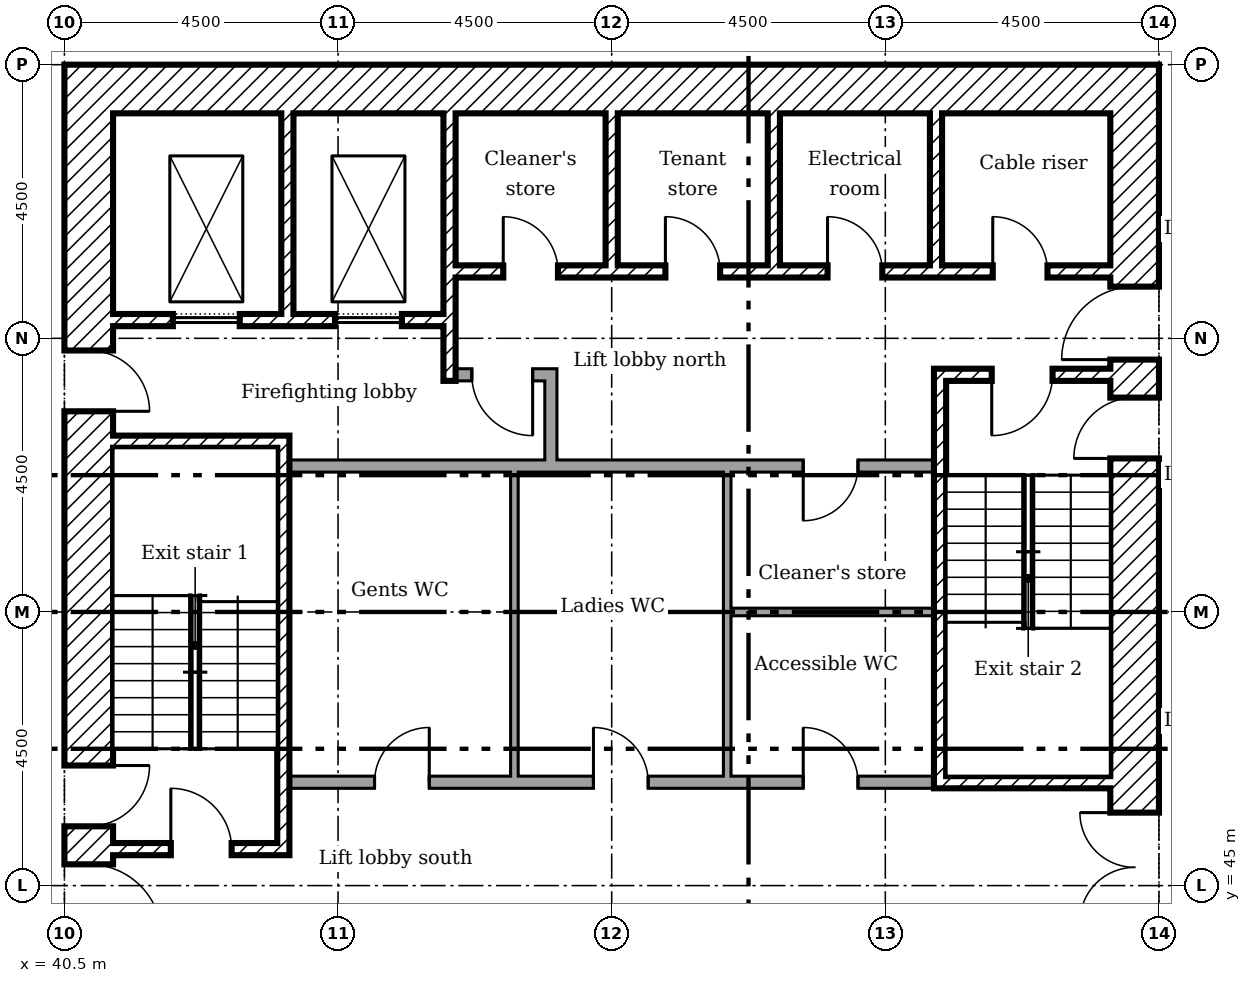
"""IFC4 building model, lengths in metres.
Left out: names, types, materials, properties, quantities, classifications, styles, units other than length and angle.
Written with IfcOpenShell. Run it as: python <this file> out.ifc"""

import sys

from ifc_helpers import new_model, si_unit, direction, frame, frame_2d, origin, place, context, subcontext, project, spatial, rectangle, extrude, element, fill, save


model = new_model("IFC4")
c1 = context("Model", 3, precision=1e-05, world=origin(), true_north=direction((0.0, 1.0)))
c2 = subcontext(c1, "Body", "Model", "MODEL_VIEW")
j1 = project(units=[si_unit("LENGTHUNIT", "METRE"), si_unit("PLANEANGLEUNIT", "RADIAN")], contexts=[c1])
p1 = place(None, origin())
s1 = spatial("IfcSite", under=j1, at=p1, CompositionType="ELEMENT")
p2 = place(p1, origin())
s2 = spatial("IfcBuilding", under=s1, at=p2, CompositionType="ELEMENT")
p3 = place(p2, frame((0.0, 0.0, 72.6)))
s3 = spatial("IfcBuildingStorey", under=s2, at=p3, CompositionType="ELEMENT", Elevation=72.6)
p4 = place(p3, frame((58.1, 40.5, 0.0), z_axis=(0.0, 0.0, 1.0), x_axis=(0.0, 1.0, 0.0)))
e1 = element("IfcWall", 1, at=p4, inside=s3, PredefinedType="SHEAR", context=c2, shape_type="SweptSolid", body=[
    extrude(rectangle(XDim=18.0, YDim=0.8, at=frame_2d((9.0, 0.0))), origin(), (0.0, 0.0, 1.0), 3.35),
])
p5 = place(p4, frame((13.15, 0.0, 0.0)))
e2 = element("IfcOpeningElement", 2, at=p5, cuts=e1, PredefinedType="OPENING", context=c2, shape_type="SweptSolid", body=[
    extrude(rectangle(XDim=1.2, YDim=2.1, at=frame_2d((0.6, 1.05))), frame((0.0, 0.41, 0.0), z_axis=(0.0, -1.0, 0.0), x_axis=(1.0, 0.0, 0.0)), (0.0, 0.0, 1.0), 0.82),
])
p6 = place(p4, frame((3.9, 0.0, 0.0)))
e3 = element("IfcOpeningElement", 3, at=p6, cuts=e1, PredefinedType="OPENING", context=c2, shape_type="SweptSolid", body=[
    extrude(rectangle(XDim=1.8, YDim=2.1, at=frame_2d((0.9, 1.05))), frame((0.0, 0.41, 0.0), z_axis=(0.0, -1.0, 0.0), x_axis=(1.0, 0.0, 0.0)), (0.0, 0.0, 1.0), 0.82),
])
p7 = place(p4, frame((11.525, 0.0, 0.0)))
e4 = element("IfcOpeningElement", 4, at=p7, cuts=e1, PredefinedType="OPENING", context=c2, shape_type="SweptSolid", body=[
    extrude(rectangle(XDim=1.0, YDim=2.1, at=frame_2d((0.5, 1.05))), frame((0.0, 0.41, 0.0), z_axis=(0.0, -1.0, 0.0), x_axis=(1.0, 0.0, 0.0)), (0.0, 0.0, 1.0), 0.82),
])
p8 = place(p3, frame((41.3, 58.1, 0.0)))
e5 = element("IfcWall", 5, at=p8, inside=s3, PredefinedType="SHEAR", context=c2, shape_type="SweptSolid", body=[
    extrude(rectangle(XDim=16.4, YDim=0.8, at=frame_2d((8.2, 0.0))), origin(), (0.0, 0.0, 1.0), 3.35),
])
p9 = place(p3, frame((40.9, 40.5, 0.0), z_axis=(0.0, 0.0, 1.0), x_axis=(0.0, 1.0, 0.0)))
e6 = element("IfcWall", 6, at=p9, inside=s3, PredefinedType="SHEAR", context=c2, shape_type="SweptSolid", body=[
    extrude(rectangle(XDim=18.0, YDim=0.8, at=frame_2d((9.0, 0.0))), origin(), (0.0, 0.0, 1.0), 3.35),
])
p10 = place(p9, frame((3.65, 0.0, 0.0)))
e7 = element("IfcOpeningElement", 7, at=p10, cuts=e6, PredefinedType="OPENING", context=c2, shape_type="SweptSolid", body=[
    extrude(rectangle(XDim=1.2, YDim=2.1, at=frame_2d((0.6, 1.05))), frame((0.0, 0.41, 0.0), z_axis=(0.0, -1.0, 0.0), x_axis=(1.0, 0.0, 0.0)), (0.0, 0.0, 1.0), 0.82),
])
p11 = place(p9, frame((5.475, 0.0, 0.0)))
e8 = element("IfcOpeningElement", 8, at=p11, cuts=e6, PredefinedType="OPENING", context=c2, shape_type="SweptSolid", body=[
    extrude(rectangle(XDim=1.0, YDim=2.1, at=frame_2d((0.5, 1.05))), frame((0.0, 0.41, 0.0), z_axis=(0.0, -1.0, 0.0), x_axis=(1.0, 0.0, 0.0)), (0.0, 0.0, 1.0), 0.82),
])
p12 = place(p9, frame((12.3, 0.0, 0.0)))
e9 = element("IfcOpeningElement", 9, at=p12, cuts=e6, PredefinedType="OPENING", context=c2, shape_type="SweptSolid", body=[
    extrude(rectangle(XDim=1.0, YDim=2.1, at=frame_2d((0.5, 1.05))), frame((0.0, 0.41, 0.0), z_axis=(0.0, -1.0, 0.0), x_axis=(1.0, 0.0, 0.0)), (0.0, 0.0, 1.0), 0.82),
])
p13 = place(p3, frame((44.167, 57.7, 0.0), z_axis=(0.0, 0.0, 1.0), x_axis=(0.0, -1.0, 0.0)))
e10 = element("IfcWall", 10, at=p13, inside=s3, PredefinedType="SHEAR", context=c2, shape_type="SweptSolid", body=[
    extrude(rectangle(XDim=3.3, YDim=0.2, at=frame_2d((1.65, 0.0))), origin(), (0.0, 0.0, 1.0), 3.35),
])
p14 = place(p3, frame((46.833, 57.7, 0.0), z_axis=(0.0, 0.0, 1.0), x_axis=(0.0, -1.0, 0.0)))
e11 = element("IfcWall", 11, at=p14, inside=s3, PredefinedType="SHEAR", context=c2, shape_type="SweptSolid", body=[
    extrude(rectangle(XDim=4.4, YDim=0.2, at=frame_2d((2.2, 0.0))), origin(), (0.0, 0.0, 1.0), 3.35),
])
for number, where, z_axis, x_axis in (
    (12, (49.5, 57.7, 0.0), (0.0, 0.0, 1.0), (0.0, -1.0, 0.0)),
    (13, (52.167, 57.7, 0.0), (0.0, 0.0, 1.0), (0.0, -1.0, 0.0)),
    (14, (54.833, 57.7, 0.0), (0.0, 0.0, 1.0), (0.0, -1.0, 0.0)),
):
    element("IfcWall", number, at=place(p3, frame(where, z_axis=z_axis, x_axis=x_axis)), inside=s3, PredefinedType="SHEAR", context=c2, shape_type="SweptSolid", body=[
        extrude(rectangle(XDim=2.5, YDim=0.2, at=frame_2d((1.25, 0.0))), origin(), (0.0, 0.0, 1.0), 3.35),
    ])
p15 = place(p3, frame((48.5, 51.9, 0.0), z_axis=(0.0, 0.0, 1.0), x_axis=(0.0, 1.0, 0.0)))
e15 = element("IfcWall", 15, at=p15, inside=s3, PredefinedType="PARTITIONING", context=c2, shape_type="SweptSolid", body=[
    extrude(rectangle(XDim=1.6, YDim=0.2, at=frame_2d((0.8, 0.0))), origin(), (0.0, 0.0, 1.0), 3.35),
])
p16 = place(p3, frame((46.933, 53.4, 0.0)))
e16 = element("IfcWall", 16, at=p16, inside=s3, PredefinedType="PARTITIONING", context=c2, shape_type="SweptSolid", body=[
    extrude(rectangle(XDim=1.467, YDim=0.2, at=frame_2d((0.733, 0.0))), origin(), (0.0, 0.0, 1.0), 3.35),
])
p17 = place(p16, frame((0.267, 0.0, 0.0)))
e17 = element("IfcOpeningElement", 17, at=p17, cuts=e16, PredefinedType="OPENING", context=c2, shape_type="SweptSolid", body=[
    extrude(rectangle(XDim=1.0, YDim=2.1, at=frame_2d((0.5, 1.05))), frame((0.0, 0.11, 0.0), z_axis=(0.0, -1.0, 0.0), x_axis=(1.0, 0.0, 0.0)), (0.0, 0.0, 1.0), 0.22),
])
p18 = place(p3, frame((46.933, 55.1, 0.0)))
e18 = element("IfcWall", 18, at=p18, inside=s3, PredefinedType="SHEAR", context=c2, shape_type="SweptSolid", body=[
    extrude(rectangle(XDim=10.767, YDim=0.2, at=frame_2d((5.383, 0.0))), origin(), (0.0, 0.0, 1.0), 3.35),
])
p19 = place(p18, frame((8.833, 0.0, 0.0)))
e19 = element("IfcOpeningElement", 19, at=p19, cuts=e18, PredefinedType="OPENING", context=c2, shape_type="SweptSolid", body=[
    extrude(rectangle(XDim=0.9, YDim=2.1, at=frame_2d((0.45, 1.05))), frame((0.0, 0.11, 0.0), z_axis=(0.0, -1.0, 0.0), x_axis=(1.0, 0.0, 0.0)), (0.0, 0.0, 1.0), 0.22),
])
p20 = place(p18, frame((0.783, 0.0, 0.0)))
e20 = element("IfcOpeningElement", 20, at=p20, cuts=e18, PredefinedType="OPENING", context=c2, shape_type="SweptSolid", body=[
    extrude(rectangle(XDim=0.9, YDim=2.1, at=frame_2d((0.45, 1.05))), frame((0.0, 0.11, 0.0), z_axis=(0.0, -1.0, 0.0), x_axis=(1.0, 0.0, 0.0)), (0.0, 0.0, 1.0), 0.22),
])
p21 = place(p18, frame((3.45, 0.0, 0.0)))
e21 = element("IfcOpeningElement", 21, at=p21, cuts=e18, PredefinedType="OPENING", context=c2, shape_type="SweptSolid", body=[
    extrude(rectangle(XDim=0.9, YDim=2.1, at=frame_2d((0.45, 1.05))), frame((0.0, 0.11, 0.0), z_axis=(0.0, -1.0, 0.0), x_axis=(1.0, 0.0, 0.0)), (0.0, 0.0, 1.0), 0.22),
])
p22 = place(p18, frame((6.117, 0.0, 0.0)))
e22 = element("IfcOpeningElement", 22, at=p22, cuts=e18, PredefinedType="OPENING", context=c2, shape_type="SweptSolid", body=[
    extrude(rectangle(XDim=0.9, YDim=2.1, at=frame_2d((0.45, 1.05))), frame((0.0, 0.11, 0.0), z_axis=(0.0, -1.0, 0.0), x_axis=(1.0, 0.0, 0.0)), (0.0, 0.0, 1.0), 0.22),
])
p23 = place(p3, frame((41.3, 54.3, 0.0)))
e23 = element("IfcWall", 23, at=p23, inside=s3, PredefinedType="SHEAR", context=c2, shape_type="SweptSolid", body=[
    extrude(rectangle(XDim=5.433, YDim=0.2, at=frame_2d((2.717, 0.0))), origin(), (0.0, 0.0, 1.0), 3.35),
])
p24 = place(p23, frame((0.983, 0.0, 0.0)))
e24 = element("IfcOpeningElement", 24, at=p24, cuts=e23, PredefinedType="OPENING", context=c2, shape_type="SweptSolid", body=[
    extrude(rectangle(XDim=1.1, YDim=2.1, at=frame_2d((0.55, 1.05))), frame((0.0, 0.11, 0.0), z_axis=(0.0, -1.0, 0.0), x_axis=(1.0, 0.0, 0.0)), (0.0, 0.0, 1.0), 0.22),
])
p25 = place(p23, frame((3.65, 0.0, 0.0)))
e25 = element("IfcOpeningElement", 25, at=p25, cuts=e23, PredefinedType="OPENING", context=c2, shape_type="SweptSolid", body=[
    extrude(rectangle(XDim=1.1, YDim=2.1, at=frame_2d((0.55, 1.05))), frame((0.0, 0.11, 0.0), z_axis=(0.0, -1.0, 0.0), x_axis=(1.0, 0.0, 0.0)), (0.0, 0.0, 1.0), 0.22),
])
p26 = place(p3, frame((44.1, 45.5, 0.0), z_axis=(0.0, 0.0, 1.0), x_axis=(0.0, 1.0, 0.0)))
e26 = element("IfcWall", 26, at=p26, inside=s3, PredefinedType="SHEAR", context=c2, shape_type="SweptSolid", body=[
    extrude(rectangle(XDim=6.9, YDim=0.2, at=frame_2d((3.45, 0.0))), origin(), (0.0, 0.0, 1.0), 3.35),
])
p27 = place(p3, frame((41.3, 52.3, 0.0)))
e27 = element("IfcWall", 27, at=p27, inside=s3, PredefinedType="SHEAR", context=c2, shape_type="SweptSolid", body=[
    extrude(rectangle(XDim=2.7, YDim=0.2, at=frame_2d((1.35, 0.0))), origin(), (0.0, 0.0, 1.0), 3.35),
])
p28 = place(p3, frame((41.3, 45.6, 0.0)))
e28 = element("IfcWall", 28, at=p28, inside=s3, PredefinedType="SHEAR", context=c2, shape_type="SweptSolid", body=[
    extrude(rectangle(XDim=2.7, YDim=0.2, at=frame_2d((1.35, 0.0))), origin(), (0.0, 0.0, 1.0), 3.35),
])
p29 = place(p28, frame((0.95, 0.0, 0.0)))
e29 = element("IfcOpeningElement", 29, at=p29, cuts=e28, PredefinedType="OPENING", context=c2, shape_type="SweptSolid", body=[
    extrude(rectangle(XDim=1.0, YDim=2.1, at=frame_2d((0.5, 1.05))), frame((0.0, 0.11, 0.0), z_axis=(0.0, -1.0, 0.0), x_axis=(1.0, 0.0, 0.0)), (0.0, 0.0, 1.0), 0.22),
])
p30 = place(p3, frame((54.8, 53.4, 0.0)))
e30 = element("IfcWall", 30, at=p30, inside=s3, PredefinedType="SHEAR", context=c2, shape_type="SweptSolid", body=[
    extrude(rectangle(XDim=2.9, YDim=0.2, at=frame_2d((1.45, 0.0))), origin(), (0.0, 0.0, 1.0), 3.35),
])
p31 = place(p30, frame((0.95, 0.0, 0.0)))
e31 = element("IfcOpeningElement", 31, at=p31, cuts=e30, PredefinedType="OPENING", context=c2, shape_type="SweptSolid", body=[
    extrude(rectangle(XDim=1.0, YDim=2.1, at=frame_2d((0.5, 1.05))), frame((0.0, 0.11, 0.0), z_axis=(0.0, -1.0, 0.0), x_axis=(1.0, 0.0, 0.0)), (0.0, 0.0, 1.0), 0.22),
])
p32 = place(p3, frame((54.8, 46.7, 0.0)))
e32 = element("IfcWall", 32, at=p32, inside=s3, PredefinedType="SHEAR", context=c2, shape_type="SweptSolid", body=[
    extrude(rectangle(XDim=2.9, YDim=0.2, at=frame_2d((1.45, 0.0))), origin(), (0.0, 0.0, 1.0), 3.35),
])
p33 = place(p3, frame((54.9, 46.8, 0.0), z_axis=(0.0, 0.0, 1.0), x_axis=(0.0, 1.0, 0.0)))
e33 = element("IfcWall", 33, at=p33, inside=s3, PredefinedType="SHEAR", context=c2, shape_type="SweptSolid", body=[
    extrude(rectangle(XDim=6.5, YDim=0.2, at=frame_2d((3.25, 0.0))), origin(), (0.0, 0.0, 1.0), 3.35),
])
p34 = place(p3, frame((44.2, 51.9, 0.0)))
e34 = element("IfcWall", 34, at=p34, inside=s3, PredefinedType="PARTITIONING", context=c2, shape_type="SweptSolid", body=[
    extrude(rectangle(XDim=10.6, YDim=0.2, at=frame_2d((5.3, 0.0))), origin(), (0.0, 0.0, 1.0), 3.35),
])
p35 = place(p34, frame((8.45, 0.0, 0.0)))
e35 = element("IfcOpeningElement", 35, at=p35, cuts=e34, PredefinedType="OPENING", context=c2, shape_type="SweptSolid", body=[
    extrude(rectangle(XDim=0.9, YDim=2.1, at=frame_2d((0.45, 1.05))), frame((0.0, 0.11, 0.0), z_axis=(0.0, -1.0, 0.0), x_axis=(1.0, 0.0, 0.0)), (0.0, 0.0, 1.0), 0.22),
])
p36 = place(p3, frame((44.2, 46.7, 0.0)))
e36 = element("IfcWall", 36, at=p36, inside=s3, PredefinedType="PARTITIONING", context=c2, shape_type="SweptSolid", body=[
    extrude(rectangle(XDim=10.6, YDim=0.2, at=frame_2d((5.3, 0.0))), origin(), (0.0, 0.0, 1.0), 3.35),
])
p37 = place(p36, frame((1.4, 0.0, 0.0)))
e37 = element("IfcOpeningElement", 37, at=p37, cuts=e36, PredefinedType="OPENING", context=c2, shape_type="SweptSolid", body=[
    extrude(rectangle(XDim=0.9, YDim=2.1, at=frame_2d((0.45, 1.05))), frame((0.0, 0.11, 0.0), z_axis=(0.0, -1.0, 0.0), x_axis=(1.0, 0.0, 0.0)), (0.0, 0.0, 1.0), 0.22),
])
p38 = place(p36, frame((5.0, 0.0, 0.0)))
e38 = element("IfcOpeningElement", 38, at=p38, cuts=e36, PredefinedType="OPENING", context=c2, shape_type="SweptSolid", body=[
    extrude(rectangle(XDim=0.9, YDim=2.1, at=frame_2d((0.45, 1.05))), frame((0.0, 0.11, 0.0), z_axis=(0.0, -1.0, 0.0), x_axis=(1.0, 0.0, 0.0)), (0.0, 0.0, 1.0), 0.22),
])
p39 = place(p36, frame((8.45, 0.0, 0.0)))
e39 = element("IfcOpeningElement", 39, at=p39, cuts=e36, PredefinedType="OPENING", context=c2, shape_type="SweptSolid", body=[
    extrude(rectangle(XDim=0.9, YDim=2.1, at=frame_2d((0.45, 1.05))), frame((0.0, 0.11, 0.0), z_axis=(0.0, -1.0, 0.0), x_axis=(1.0, 0.0, 0.0)), (0.0, 0.0, 1.0), 0.22),
])
p40 = place(p3, frame((47.9, 46.8, 0.0), z_axis=(0.0, 0.0, 1.0), x_axis=(0.0, 1.0, 0.0)))
e40 = element("IfcWall", 40, at=p40, inside=s3, PredefinedType="PARTITIONING", context=c2, shape_type="SweptSolid", body=[
    extrude(rectangle(XDim=5.0, YDim=0.125, at=frame_2d((2.5, 0.0))), origin(), (0.0, 0.0, 1.0), 3.35),
])
p41 = place(p3, frame((51.4, 46.8, 0.0), z_axis=(0.0, 0.0, 1.0), x_axis=(0.0, 1.0, 0.0)))
e41 = element("IfcWall", 41, at=p41, inside=s3, PredefinedType="PARTITIONING", context=c2, shape_type="SweptSolid", body=[
    extrude(rectangle(XDim=2.762, YDim=0.125, at=frame_2d((1.381, 0.0))), origin(), (0.0, 0.0, 1.0), 3.35),
])
p42 = place(p3, frame((54.8, 49.5, 0.0), z_axis=(0.0, 0.0, 1.0), x_axis=(-1.0, 0.0, 0.0)))
e42 = element("IfcWall", 42, at=p42, inside=s3, PredefinedType="PARTITIONING", context=c2, shape_type="SweptSolid", body=[
    extrude(rectangle(XDim=3.338, YDim=0.125, at=frame_2d((1.669, 0.0))), origin(), (0.0, 0.0, 1.0), 3.35),
])
p43 = place(p3, frame((51.4, 49.5, 0.0), z_axis=(0.0, 0.0, 1.0), x_axis=(0.0, 1.0, 0.0)))
e43 = element("IfcWall", 43, at=p43, inside=s3, PredefinedType="PARTITIONING", context=c2, shape_type="SweptSolid", body=[
    extrude(rectangle(XDim=2.3, YDim=0.125, at=frame_2d((1.15, 0.0))), origin(), (0.0, 0.0, 1.0), 3.35),
])
p44 = place(p5, origin())
e44 = element("IfcDoor", 44, at=p44, inside=s3, OperationType="SINGLE_SWING_RIGHT", PredefinedType="DOOR", context=c2, shape_type="SweptSolid", body=[
    extrude(rectangle(XDim=1.2, YDim=2.1, at=frame_2d((0.6, 1.05))), frame((0.0, 0.025, 0.0), z_axis=(0.0, -1.0, 0.0), x_axis=(1.0, 0.0, 0.0)), (0.0, 0.0, 1.0), 0.05),
])
fill(e2, e44)
p45 = place(p6, origin())
e45 = element("IfcDoor", 45, at=p45, inside=s3, OperationType="DOUBLE_DOOR_SINGLE_SWING", PredefinedType="DOOR", context=c2, shape_type="SweptSolid", body=[
    extrude(rectangle(XDim=1.8, YDim=2.1, at=frame_2d((0.9, 1.05))), frame((0.0, 0.025, 0.0), z_axis=(0.0, -1.0, 0.0), x_axis=(1.0, 0.0, 0.0)), (0.0, 0.0, 1.0), 0.05),
])
fill(e3, e45)
p46 = place(p10, frame((1.2, 0.0, 0.0), x_axis=(-1.0, 0.0, 0.0)))
e46 = element("IfcDoor", 46, at=p46, inside=s3, OperationType="SINGLE_SWING_LEFT", PredefinedType="DOOR", context=c2, shape_type="SweptSolid", body=[
    extrude(rectangle(XDim=1.2, YDim=2.1, at=frame_2d((0.6, 1.05))), frame((0.0, 0.025, 0.0), z_axis=(0.0, -1.0, 0.0), x_axis=(1.0, 0.0, 0.0)), (0.0, 0.0, 1.0), 0.05),
])
fill(e7, e46)
p47 = place(p29, origin())
e47 = element("IfcDoor", 47, at=p47, inside=s3, OperationType="SINGLE_SWING_RIGHT", PredefinedType="DOOR", context=c2, shape_type="SweptSolid", body=[
    extrude(rectangle(XDim=1.0, YDim=2.1, at=frame_2d((0.5, 1.05))), frame((0.0, 0.025, 0.0), z_axis=(0.0, -1.0, 0.0), x_axis=(1.0, 0.0, 0.0)), (0.0, 0.0, 1.0), 0.05),
])
fill(e29, e47)
p48 = place(p11, frame((1.0, 0.0, 0.0), x_axis=(-1.0, 0.0, 0.0)))
e48 = element("IfcDoor", 48, at=p48, inside=s3, OperationType="SINGLE_SWING_RIGHT", PredefinedType="DOOR", context=c2, shape_type="SweptSolid", body=[
    extrude(rectangle(XDim=1.0, YDim=2.1, at=frame_2d((0.5, 1.05))), frame((0.0, 0.025, 0.0), z_axis=(0.0, -1.0, 0.0), x_axis=(1.0, 0.0, 0.0)), (0.0, 0.0, 1.0), 0.05),
])
fill(e8, e48)
p49 = place(p31, frame((1.0, 0.0, 0.0), x_axis=(-1.0, 0.0, 0.0)))
e49 = element("IfcDoor", 49, at=p49, inside=s3, OperationType="SINGLE_SWING_LEFT", PredefinedType="DOOR", context=c2, shape_type="SweptSolid", body=[
    extrude(rectangle(XDim=1.0, YDim=2.1, at=frame_2d((0.5, 1.05))), frame((0.0, 0.025, 0.0), z_axis=(0.0, -1.0, 0.0), x_axis=(1.0, 0.0, 0.0)), (0.0, 0.0, 1.0), 0.05),
])
fill(e31, e49)
p50 = place(p7, origin())
e50 = element("IfcDoor", 50, at=p50, inside=s3, OperationType="SINGLE_SWING_RIGHT", PredefinedType="DOOR", context=c2, shape_type="SweptSolid", body=[
    extrude(rectangle(XDim=1.0, YDim=2.1, at=frame_2d((0.5, 1.05))), frame((0.0, 0.025, 0.0), z_axis=(0.0, -1.0, 0.0), x_axis=(1.0, 0.0, 0.0)), (0.0, 0.0, 1.0), 0.05),
])
fill(e4, e50)
p51 = place(p17, frame((1.0, 0.0, 0.0), x_axis=(-1.0, 0.0, 0.0)))
e51 = element("IfcDoor", 51, at=p51, inside=s3, OperationType="SINGLE_SWING_RIGHT", PredefinedType="DOOR", context=c2, shape_type="SweptSolid", body=[
    extrude(rectangle(XDim=1.0, YDim=2.1, at=frame_2d((0.5, 1.05))), frame((0.0, 0.025, 0.0), z_axis=(0.0, -1.0, 0.0), x_axis=(1.0, 0.0, 0.0)), (0.0, 0.0, 1.0), 0.05),
])
fill(e17, e51)
p52 = place(p12, frame((1.0, 0.0, 0.0), x_axis=(-1.0, 0.0, 0.0)))
e52 = element("IfcDoor", 52, at=p52, inside=s3, OperationType="SINGLE_SWING_LEFT", PredefinedType="DOOR", context=c2, shape_type="SweptSolid", body=[
    extrude(rectangle(XDim=1.0, YDim=2.1, at=frame_2d((0.5, 1.05))), frame((0.0, 0.025, 0.0), z_axis=(0.0, -1.0, 0.0), x_axis=(1.0, 0.0, 0.0)), (0.0, 0.0, 1.0), 0.05),
])
fill(e9, e52)
p53 = place(p19, origin())
e53 = element("IfcDoor", 53, at=p53, inside=s3, OperationType="SINGLE_SWING_RIGHT", PredefinedType="DOOR", context=c2, shape_type="SweptSolid", body=[
    extrude(rectangle(XDim=0.9, YDim=2.1, at=frame_2d((0.45, 1.05))), frame((0.0, 0.025, 0.0), z_axis=(0.0, -1.0, 0.0), x_axis=(1.0, 0.0, 0.0)), (0.0, 0.0, 1.0), 0.05),
])
fill(e19, e53)
p54 = place(p20, origin())
e54 = element("IfcDoor", 54, at=p54, inside=s3, OperationType="SINGLE_SWING_RIGHT", PredefinedType="DOOR", context=c2, shape_type="SweptSolid", body=[
    extrude(rectangle(XDim=0.9, YDim=2.1, at=frame_2d((0.45, 1.05))), frame((0.0, 0.025, 0.0), z_axis=(0.0, -1.0, 0.0), x_axis=(1.0, 0.0, 0.0)), (0.0, 0.0, 1.0), 0.05),
])
fill(e20, e54)
p55 = place(p21, origin())
e55 = element("IfcDoor", 55, at=p55, inside=s3, OperationType="SINGLE_SWING_RIGHT", PredefinedType="DOOR", context=c2, shape_type="SweptSolid", body=[
    extrude(rectangle(XDim=0.9, YDim=2.1, at=frame_2d((0.45, 1.05))), frame((0.0, 0.025, 0.0), z_axis=(0.0, -1.0, 0.0), x_axis=(1.0, 0.0, 0.0)), (0.0, 0.0, 1.0), 0.05),
])
fill(e21, e55)
p56 = place(p22, origin())
e56 = element("IfcDoor", 56, at=p56, inside=s3, OperationType="SINGLE_SWING_RIGHT", PredefinedType="DOOR", context=c2, shape_type="SweptSolid", body=[
    extrude(rectangle(XDim=0.9, YDim=2.1, at=frame_2d((0.45, 1.05))), frame((0.0, 0.025, 0.0), z_axis=(0.0, -1.0, 0.0), x_axis=(1.0, 0.0, 0.0)), (0.0, 0.0, 1.0), 0.05),
])
fill(e22, e56)
p57 = place(p37, origin())
e57 = element("IfcDoor", 57, at=p57, inside=s3, OperationType="SINGLE_SWING_LEFT", PredefinedType="DOOR", context=c2, shape_type="SweptSolid", body=[
    extrude(rectangle(XDim=0.9, YDim=2.1, at=frame_2d((0.45, 1.05))), frame((0.0, 0.025, 0.0), z_axis=(0.0, -1.0, 0.0), x_axis=(1.0, 0.0, 0.0)), (0.0, 0.0, 1.0), 0.05),
])
fill(e37, e57)
p58 = place(p38, origin())
e58 = element("IfcDoor", 58, at=p58, inside=s3, OperationType="SINGLE_SWING_RIGHT", PredefinedType="DOOR", context=c2, shape_type="SweptSolid", body=[
    extrude(rectangle(XDim=0.9, YDim=2.1, at=frame_2d((0.45, 1.05))), frame((0.0, 0.025, 0.0), z_axis=(0.0, -1.0, 0.0), x_axis=(1.0, 0.0, 0.0)), (0.0, 0.0, 1.0), 0.05),
])
fill(e38, e58)
p59 = place(p39, origin())
e59 = element("IfcDoor", 59, at=p59, inside=s3, OperationType="SINGLE_SWING_RIGHT", PredefinedType="DOOR", context=c2, shape_type="SweptSolid", body=[
    extrude(rectangle(XDim=0.9, YDim=2.1, at=frame_2d((0.45, 1.05))), frame((0.0, 0.025, 0.0), z_axis=(0.0, -1.0, 0.0), x_axis=(1.0, 0.0, 0.0)), (0.0, 0.0, 1.0), 0.05),
])
fill(e39, e59)
p60 = place(p35, frame((0.9, 0.0, 0.0), x_axis=(-1.0, 0.0, 0.0)))
e60 = element("IfcDoor", 60, at=p60, inside=s3, OperationType="SINGLE_SWING_LEFT", PredefinedType="DOOR", context=c2, shape_type="SweptSolid", body=[
    extrude(rectangle(XDim=0.9, YDim=2.1, at=frame_2d((0.45, 1.05))), frame((0.0, 0.025, 0.0), z_axis=(0.0, -1.0, 0.0), x_axis=(1.0, 0.0, 0.0)), (0.0, 0.0, 1.0), 0.05),
])
fill(e35, e60)
p61 = place(p24, origin())
e61 = element("IfcDoor", 61, at=p61, inside=s3, OperationType="SLIDING_TO_LEFT", PredefinedType="DOOR", context=c2, shape_type="SweptSolid", body=[
    extrude(rectangle(XDim=1.1, YDim=2.1, at=frame_2d((0.55, 1.05))), frame((0.0, 0.025, 0.0), z_axis=(0.0, -1.0, 0.0), x_axis=(1.0, 0.0, 0.0)), (0.0, 0.0, 1.0), 0.05),
])
fill(e24, e61)
p62 = place(p25, origin())
e62 = element("IfcDoor", 62, at=p62, inside=s3, OperationType="SLIDING_TO_LEFT", PredefinedType="DOOR", context=c2, shape_type="SweptSolid", body=[
    extrude(rectangle(XDim=1.1, YDim=2.1, at=frame_2d((0.55, 1.05))), frame((0.0, 0.025, 0.0), z_axis=(0.0, -1.0, 0.0), x_axis=(1.0, 0.0, 0.0)), (0.0, 0.0, 1.0), 0.05),
])
fill(e25, e62)
save(model, sys.argv[1])
